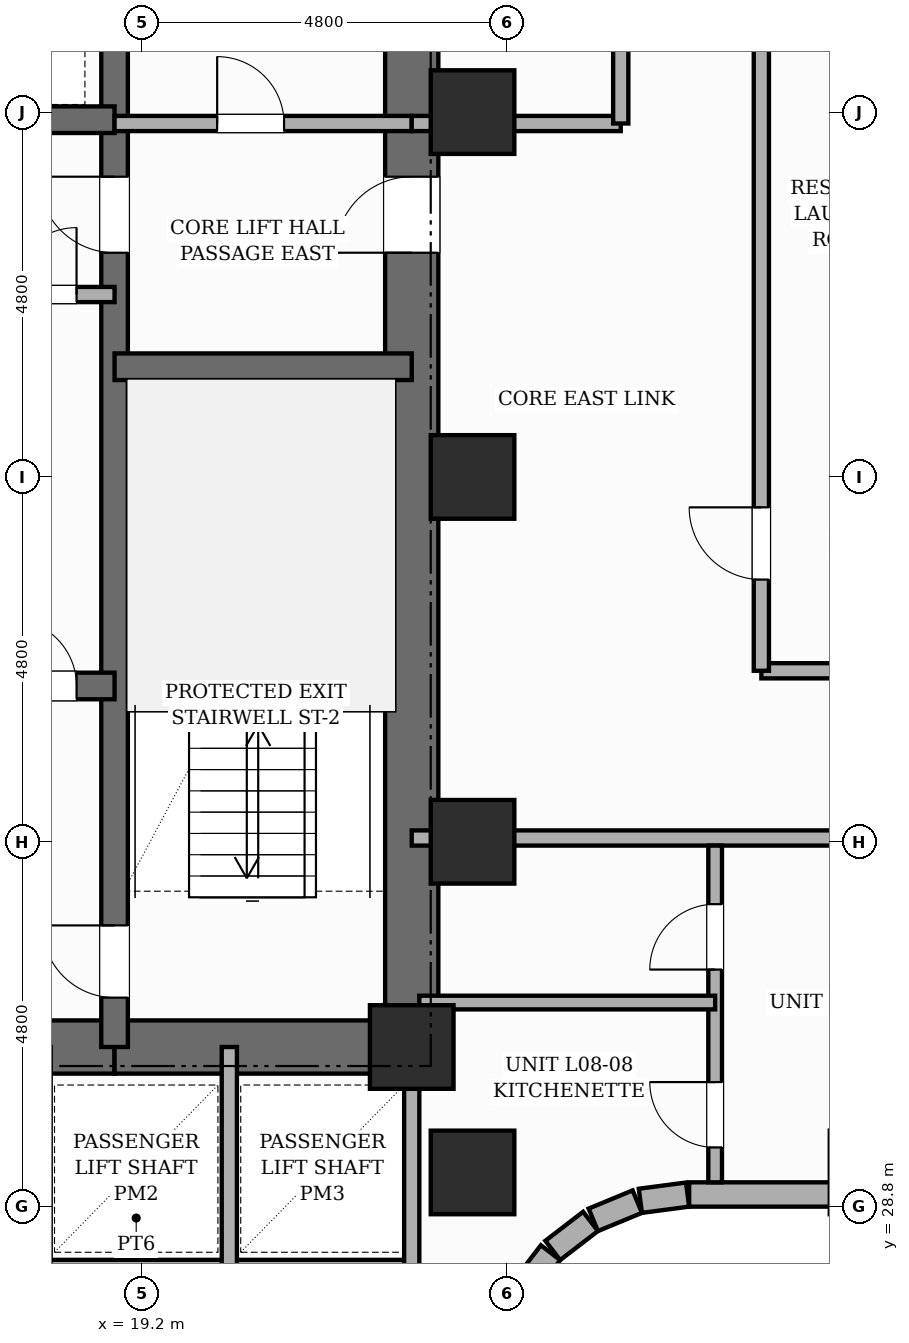
"""IFC4 building model, lengths in metres.
Left out: names, types, materials, properties, quantities, classifications, styles, units other than length and angle.
Written with IfcOpenShell. Run it as: python <this file> out.ifc"""

import sys

from ifc_helpers import new_model, si_unit, direction, frame, frame_2d, origin, origin_2d, place, context, subcontext, project, spatial, rectangle, extrude, element, fill, save


model = new_model("IFC4")
c1 = context("Model", 3, precision=1e-05, world=origin(), true_north=direction((0.0, 1.0)))
c2 = subcontext(c1, "Body", "Model", "MODEL_VIEW")
j1 = project(units=[si_unit("LENGTHUNIT", "METRE"), si_unit("PLANEANGLEUNIT", "RADIAN")], contexts=[c1])
p1 = place(None, origin())
s1 = spatial("IfcSite", under=j1, at=p1, CompositionType="ELEMENT")
p2 = place(p1, origin())
s2 = spatial("IfcBuilding", under=s1, at=p2, CompositionType="ELEMENT")
p3 = place(p2, frame((0.0, 0.0, 35.8)))
s3 = spatial("IfcBuildingStorey", under=s2, at=p3, CompositionType="ELEMENT", Elevation=35.8)
p4 = place(p3, frame((22.75, 30.55, 0.0), z_axis=(0.0, 0.0, 1.0), x_axis=(0.0, 1.0, 0.0)))
e1 = element("IfcWall", 1, at=p4, inside=s3, PredefinedType="SHEAR", context=c2, shape_type="SweptSolid", body=[
    extrude(rectangle(XDim=15.6, YDim=0.7, at=frame_2d((7.8, 0.0))), origin(), (0.0, 0.0, 1.0), 3.6),
])
p5 = place(p4, frame((10.8, 0.0, 0.0)))
e2 = element("IfcOpeningElement", 2, at=p5, cuts=e1, PredefinedType="OPENING", context=c2, shape_type="SweptSolid", body=[
    extrude(rectangle(XDim=1.0, YDim=2.15, at=frame_2d((0.5, 1.075))), frame((0.0, 0.36, 0.0), z_axis=(0.0, -1.0, 0.0), x_axis=(1.0, 0.0, 0.0)), (0.0, 0.0, 1.0), 0.72),
])
p6 = place(p3, frame((9.96, 30.9, 0.0), z_axis=(0.0, 0.0, 1.0), x_axis=(1.0, 0.0, 0.0)))
e3 = element("IfcWall", 3, at=p6, inside=s3, PredefinedType="SHEAR", context=c2, shape_type="SweptSolid", body=[
    extrude(rectangle(XDim=8.88, YDim=0.7, at=frame_2d((4.44, 0.0))), origin(), (0.0, 0.0, 1.0), 3.6),
])
p7 = place(p6, frame((4.09, 0.0, 0.0)))
e4 = element("IfcOpeningElement", 4, at=p7, cuts=e3, PredefinedType="OPENING", context=c2, shape_type="SweptSolid", body=[
    extrude(rectangle(XDim=1.0, YDim=2.15, at=frame_2d((0.5, 1.075))), frame((0.0, 0.36, 0.0), z_axis=(0.0, -1.0, 0.0), x_axis=(1.0, 0.0, 0.0)), (0.0, 0.0, 1.0), 0.72),
])
p8 = place(p3, frame((18.84, 30.9, 0.0), z_axis=(0.0, 0.0, 1.0), x_axis=(1.0, 0.0, 0.0)))
e5 = element("IfcWall", 5, at=p8, inside=s3, PredefinedType="SHEAR", context=c2, shape_type="SweptSolid", body=[
    extrude(rectangle(XDim=3.91, YDim=0.7, at=frame_2d((1.955, 0.0))), origin(), (0.0, 0.0, 1.0), 3.6),
])
p9 = place(p3, frame((18.84, 30.9, 0.0), z_axis=(0.0, 0.0, 1.0), x_axis=(0.0, 1.0, 0.0)))
e6 = element("IfcWall", 6, at=p9, inside=s3, PredefinedType="SHEAR", context=c2, shape_type="SweptSolid", body=[
    extrude(rectangle(XDim=14.9, YDim=0.35, at=frame_2d((7.45, 0.0))), origin(), (0.0, 0.0, 1.0), 3.6),
])
p10 = place(p9, frame((0.65, 0.0, 0.0)))
e7 = element("IfcOpeningElement", 7, at=p10, cuts=e6, PredefinedType="OPENING", context=c2, shape_type="SweptSolid", body=[
    extrude(rectangle(XDim=0.95, YDim=2.1, at=frame_2d((0.475, 1.05))), frame((0.0, 0.185, 0.0), z_axis=(0.0, -1.0, 0.0), x_axis=(1.0, 0.0, 0.0)), (0.0, 0.0, 1.0), 0.37),
])
p11 = place(p9, frame((10.45, 0.0, 0.0)))
e8 = element("IfcOpeningElement", 8, at=p11, cuts=e6, PredefinedType="OPENING", context=c2, shape_type="SweptSolid", body=[
    extrude(rectangle(XDim=1.0, YDim=2.15, at=frame_2d((0.5, 1.075))), frame((0.0, 0.185, 0.0), z_axis=(0.0, -1.0, 0.0), x_axis=(1.0, 0.0, 0.0)), (0.0, 0.0, 1.0), 0.37),
])
p12 = place(p3, frame((18.84, 39.85, 0.0), z_axis=(0.0, 0.0, 1.0), x_axis=(1.0, 0.0, 0.0)))
e9 = element("IfcWall", 9, at=p12, inside=s3, PredefinedType="SHEAR", context=c2, shape_type="SweptSolid", body=[
    extrude(rectangle(XDim=3.91, YDim=0.35, at=frame_2d((1.955, 0.0))), origin(), (0.0, 0.0, 1.0), 3.6),
])
p13 = place(p3, frame((9.96, 35.65, 0.0), z_axis=(0.0, 0.0, 1.0), x_axis=(1.0, 0.0, 0.0)))
e10 = element("IfcWall", 10, at=p13, inside=s3, PredefinedType="SHEAR", context=c2, shape_type="SweptSolid", body=[
    extrude(rectangle(XDim=8.88, YDim=0.35, at=frame_2d((4.44, 0.0))), origin(), (0.0, 0.0, 1.0), 3.6),
])
p14 = place(p13, frame((0.84, 0.0, 0.0)))
e11 = element("IfcOpeningElement", 11, at=p14, cuts=e10, PredefinedType="OPENING", context=c2, shape_type="SweptSolid", body=[
    extrude(rectangle(XDim=1.1, YDim=2.15, at=frame_2d((0.55, 1.075))), frame((0.0, 0.185, 0.0), z_axis=(0.0, -1.0, 0.0), x_axis=(1.0, 0.0, 0.0)), (0.0, 0.0, 1.0), 0.37),
])
p15 = place(p13, frame((5.24, 0.0, 0.0)))
e12 = element("IfcOpeningElement", 12, at=p15, cuts=e10, PredefinedType="OPENING", context=c2, shape_type="SweptSolid", body=[
    extrude(rectangle(XDim=1.1, YDim=2.15, at=frame_2d((0.55, 1.075))), frame((0.0, 0.185, 0.0), z_axis=(0.0, -1.0, 0.0), x_axis=(1.0, 0.0, 0.0)), (0.0, 0.0, 1.0), 0.37),
])
p16 = place(p13, frame((7.5, 0.0, 0.0)))
e13 = element("IfcOpeningElement", 13, at=p16, cuts=e10, PredefinedType="OPENING", context=c2, shape_type="SweptSolid", body=[
    extrude(rectangle(XDim=0.88, YDim=2.1, at=frame_2d((0.44, 1.05))), frame((0.0, 0.185, 0.0), z_axis=(0.0, -1.0, 0.0), x_axis=(1.0, 0.0, 0.0)), (0.0, 0.0, 1.0), 0.37),
])
p17 = place(p3, frame((9.96, 43.1, 0.0), z_axis=(0.0, 0.0, 1.0), x_axis=(1.0, 0.0, 0.0)))
e14 = element("IfcWall", 14, at=p17, inside=s3, PredefinedType="SHEAR", context=c2, shape_type="SweptSolid", body=[
    extrude(rectangle(XDim=8.88, YDim=0.35, at=frame_2d((4.44, 0.0))), origin(), (0.0, 0.0, 1.0), 3.6),
])
for number, where, z_axis, x_axis in (
    (15, (22.75, 30.9, 0.0), (0.0, 0.0, 1.0), (1.0, 0.0, 0.0)),
    (16, (23.55, 29.25, 0.0), (0.0, 0.0, 1.0), (1.0, 0.0, 0.0)),
    (17, (23.55, 33.6, 0.0), (0.0, 0.0, 1.0), (1.0, 0.0, 0.0)),
    (18, (23.55, 38.4, 0.0), (0.0, 0.0, 1.0), (1.0, 0.0, 0.0)),
    (19, (23.55, 43.2, 0.0), (0.0, 0.0, 1.0), (1.0, 0.0, 0.0)),
):
    element("IfcColumn", number, at=place(p3, frame(where, z_axis=z_axis, x_axis=x_axis)), inside=s3, PredefinedType="COLUMN", context=c2, shape_type="SweptSolid", body=[
        extrude(rectangle(XDim=1.1, YDim=1.1, at=origin_2d()), origin(), (0.0, 0.0, 1.0), 3.6),
    ])
p18 = place(p3, frame((55.2, 28.96, 0.0), z_axis=(0.0, 0.0, 1.0), x_axis=(-1.0, 0.0, 0.0)))
e20 = element("IfcWall", 20, at=p18, inside=s3, PredefinedType="STANDARD", context=c2, shape_type="SweptSolid", body=[
    extrude(rectangle(XDim=28.8, YDim=0.32, at=frame_2d((14.4, 0.0))), origin(), (0.0, 0.0, 1.0), 2.53),
])
p19 = place(p18, frame((23.415, 0.0, 0.65)))
e21 = element("IfcOpeningElement", 21, at=p19, cuts=e20, PredefinedType="OPENING", context=c2, shape_type="SweptSolid", body=[
    extrude(rectangle(XDim=1.4, YDim=1.1, at=frame_2d((0.7, 0.55))), frame((0.0, 0.17, 0.0), z_axis=(0.0, -1.0, 0.0), x_axis=(1.0, 0.0, 0.0)), (0.0, 0.0, 1.0), 0.34),
])
p20 = place(p18, frame((15.034, 0.0, 0.45)))
e22 = element("IfcOpeningElement", 22, at=p20, cuts=e20, PredefinedType="OPENING", context=c2, shape_type="SweptSolid", body=[
    extrude(rectangle(XDim=0.95, YDim=1.8, at=frame_2d((0.475, 0.9))), frame((0.0, 0.17, 0.0), z_axis=(0.0, -1.0, 0.0), x_axis=(1.0, 0.0, 0.0)), (0.0, 0.0, 1.0), 0.34),
])
p21 = place(p18, frame((5.25, 0.0, 0.45)))
e23 = element("IfcOpeningElement", 23, at=p21, cuts=e20, PredefinedType="OPENING", context=c2, shape_type="SweptSolid", body=[
    extrude(rectangle(XDim=0.95, YDim=1.8, at=frame_2d((0.475, 0.9))), frame((0.0, 0.17, 0.0), z_axis=(0.0, -1.0, 0.0), x_axis=(1.0, 0.0, 0.0)), (0.0, 0.0, 1.0), 0.34),
])
p22 = place(p18, frame((12.979, 0.0, 0.65)))
e24 = element("IfcOpeningElement", 24, at=p22, cuts=e20, PredefinedType="OPENING", context=c2, shape_type="SweptSolid", body=[
    extrude(rectangle(XDim=1.4, YDim=1.1, at=frame_2d((0.7, 0.55))), frame((0.0, 0.17, 0.0), z_axis=(0.0, -1.0, 0.0), x_axis=(1.0, 0.0, 0.0)), (0.0, 0.0, 1.0), 0.34),
])
p23 = place(p18, frame((0.47, 0.0, 0.65)))
e25 = element("IfcOpeningElement", 25, at=p23, cuts=e20, PredefinedType="OPENING", context=c2, shape_type="SweptSolid", body=[
    extrude(rectangle(XDim=1.4, YDim=1.1, at=frame_2d((0.7, 0.55))), frame((0.0, 0.17, 0.0), z_axis=(0.0, -1.0, 0.0), x_axis=(1.0, 0.0, 0.0)), (0.0, 0.0, 1.0), 0.34),
])
p24 = place(p3, frame((26.379, 28.958, 0.0), z_axis=(0.0, 0.0, 1.0), x_axis=(-0.991447664465, -0.130504898859, 0.0)))
e26 = element("IfcWall", 26, at=p24, inside=s3, PredefinedType="STANDARD", context=c2, shape_type="SweptSolid", body=[
    extrude(rectangle(XDim=0.627, YDim=0.32, at=frame_2d((0.313, 0.0))), origin(), (0.0, 0.0, 1.0), 2.53),
])
p25 = place(p3, frame((25.718, 28.866, 0.0), z_axis=(0.0, 0.0, 1.0), x_axis=(-0.923836271867, -0.382787856107, 0.0)))
e27 = element("IfcWall", 27, at=p25, inside=s3, PredefinedType="STANDARD", context=c2, shape_type="SweptSolid", body=[
    extrude(rectangle(XDim=0.626, YDim=0.32, at=frame_2d((0.313, 0.0))), origin(), (0.0, 0.0, 1.0), 3.35),
])
for number, where, z_axis, x_axis in (
    (28, (25.103, 28.605, 0.0), (0.0, 0.0, 1.0), (-0.793, -0.609, 0.0)),
    (29, (24.576, 28.195, 0.0), (0.0, 0.0, 1.0), (-0.609, -0.793, 0.0)),
):
    element("IfcWall", number, at=place(p3, frame(where, z_axis=z_axis, x_axis=x_axis)), inside=s3, PredefinedType="STANDARD", context=c2, shape_type="SweptSolid", body=[
        extrude(rectangle(XDim=0.626, YDim=0.32, at=frame_2d((0.313, 0.0))), origin(), (0.0, 0.0, 1.0), 3.35),
    ])
p26 = place(p3, frame((9.96, 40.8, 0.0), z_axis=(0.0, 0.0, 1.0), x_axis=(1.0, 0.0, 0.0)))
e30 = element("IfcWall", 30, at=p26, inside=s3, PredefinedType="POLYGONAL", context=c2, shape_type="SweptSolid", body=[
    extrude(rectangle(XDim=8.88, YDim=0.2, at=frame_2d((4.44, 0.0))), origin(), (0.0, 0.0, 1.0), 3.35),
])
p27 = place(p26, frame((7.5, 0.0, 0.0)))
e31 = element("IfcOpeningElement", 31, at=p27, cuts=e30, PredefinedType="OPENING", context=c2, shape_type="SweptSolid", body=[
    extrude(rectangle(XDim=0.88, YDim=2.1, at=frame_2d((0.44, 1.05))), frame((0.0, 0.11, 0.0), z_axis=(0.0, -1.0, 0.0), x_axis=(1.0, 0.0, 0.0)), (0.0, 0.0, 1.0), 0.22),
])
p28 = place(p26, frame((1.7, 0.0, 0.0)))
e32 = element("IfcOpeningElement", 32, at=p28, cuts=e30, PredefinedType="OPENING", context=c2, shape_type="SweptSolid", body=[
    extrude(rectangle(XDim=0.88, YDim=2.1, at=frame_2d((0.44, 1.05))), frame((0.0, 0.11, 0.0), z_axis=(0.0, -1.0, 0.0), x_axis=(1.0, 0.0, 0.0)), (0.0, 0.0, 1.0), 0.22),
])
p29 = place(p26, frame((4.9, 0.0, 0.0)))
e33 = element("IfcOpeningElement", 33, at=p29, cuts=e30, PredefinedType="OPENING", context=c2, shape_type="SweptSolid", body=[
    extrude(rectangle(XDim=0.88, YDim=2.1, at=frame_2d((0.44, 1.05))), frame((0.0, 0.11, 0.0), z_axis=(0.0, -1.0, 0.0), x_axis=(1.0, 0.0, 0.0)), (0.0, 0.0, 1.0), 0.22),
])
p30 = place(p3, frame((18.84, 43.05, 0.0), z_axis=(0.0, 0.0, 1.0), x_axis=(1.0, 0.0, 0.0)))
e34 = element("IfcWall", 34, at=p30, inside=s3, PredefinedType="POLYGONAL", context=c2, shape_type="SweptSolid", body=[
    extrude(rectangle(XDim=3.91, YDim=0.2, at=frame_2d((1.955, 0.0))), origin(), (0.0, 0.0, 1.0), 2.53),
])
p31 = place(p30, frame((1.35, 0.0, 0.0)))
e35 = element("IfcOpeningElement", 35, at=p31, cuts=e34, PredefinedType="OPENING", context=c2, shape_type="SweptSolid", body=[
    extrude(rectangle(XDim=0.88, YDim=2.1, at=frame_2d((0.44, 1.05))), frame((0.0, 0.11, 0.0), z_axis=(0.0, -1.0, 0.0), x_axis=(1.0, 0.0, 0.0)), (0.0, 0.0, 1.0), 0.22),
])
p32 = place(p3, frame((15.5, 28.0, 0.0), z_axis=(0.0, 0.0, 1.0), x_axis=(1.0, 0.0, 0.0)))
e36 = element("IfcWall", 36, at=p32, inside=s3, PredefinedType="POLYGONAL", context=c2, shape_type="SweptSolid", body=[
    extrude(rectangle(XDim=7.25, YDim=0.2, at=frame_2d((3.625, 0.0))), origin(), (0.0, 0.0, 1.0), 3.35),
])
p33 = place(p3, frame((22.75, 27.9, 0.0), z_axis=(0.0, 0.0, 1.0), x_axis=(0.0, 1.0, 0.0)))
e37 = element("IfcWall", 37, at=p33, inside=s3, PredefinedType="POLYGONAL", context=c2, shape_type="SweptSolid", body=[
    extrude(rectangle(XDim=3.0, YDim=0.2, at=frame_2d((1.5, 0.0))), origin(), (0.0, 0.0, 1.0), 3.35),
])
p34 = place(p3, frame((20.35, 28.0, 0.0), z_axis=(0.0, 0.0, 1.0), x_axis=(0.0, 1.0, 0.0)))
e38 = element("IfcWall", 38, at=p34, inside=s3, PredefinedType="POLYGONAL", context=c2, shape_type="SweptSolid", body=[
    extrude(rectangle(XDim=2.9, YDim=0.2, at=frame_2d((1.45, 0.0))), origin(), (0.0, 0.0, 1.0), 3.35),
])
p35 = place(p3, frame((22.75, 33.65, 0.0), z_axis=(0.0, 0.0, 1.0), x_axis=(1.0, 0.0, 0.0)))
e39 = element("IfcWall", 39, at=p35, inside=s3, PredefinedType="PARTITIONING", context=c2, shape_type="SweptSolid", body=[
    extrude(rectangle(XDim=34.53, YDim=0.2, at=frame_2d((17.265, 0.0))), origin(), (0.0, 0.0, 1.0), 2.53),
])
p36 = place(p35, frame((6.491, 0.0, 0.0)))
e40 = element("IfcOpeningElement", 40, at=p36, cuts=e39, PredefinedType="OPENING", context=c2, shape_type="SweptSolid", body=[
    extrude(rectangle(XDim=0.98, YDim=2.18, at=frame_2d((0.49, 1.09))), frame((0.0, 0.11, 0.0), z_axis=(0.0, -1.0, 0.0), x_axis=(1.0, 0.0, 0.0)), (0.0, 0.0, 1.0), 0.22),
])
p37 = place(p35, frame((13.406, 0.0, 0.0)))
e41 = element("IfcOpeningElement", 41, at=p37, cuts=e39, PredefinedType="OPENING", context=c2, shape_type="SweptSolid", body=[
    extrude(rectangle(XDim=0.98, YDim=2.18, at=frame_2d((0.49, 1.09))), frame((0.0, 0.11, 0.0), z_axis=(0.0, -1.0, 0.0), x_axis=(1.0, 0.0, 0.0)), (0.0, 0.0, 1.0), 0.22),
])
p38 = place(p35, frame((24.09, 0.0, 0.0)))
e42 = element("IfcOpeningElement", 42, at=p38, cuts=e39, PredefinedType="OPENING", context=c2, shape_type="SweptSolid", body=[
    extrude(rectangle(XDim=0.98, YDim=2.18, at=frame_2d((0.49, 1.09))), frame((0.0, 0.11, 0.0), z_axis=(0.0, -1.0, 0.0), x_axis=(1.0, 0.0, 0.0)), (0.0, 0.0, 1.0), 0.22),
])
p39 = place(p3, frame((27.35, 35.85, 0.0), z_axis=(0.0, 0.0, 1.0), x_axis=(1.0, 0.0, 0.0)))
e43 = element("IfcWall", 43, at=p39, inside=s3, PredefinedType="PARTITIONING", context=c2, shape_type="SweptSolid", body=[
    extrude(rectangle(XDim=14.43, YDim=0.2, at=frame_2d((7.215, 0.0))), origin(), (0.0, 0.0, 1.0), 3.35),
])
p40 = place(p39, frame((4.803, 0.0, 0.0)))
e44 = element("IfcOpeningElement", 44, at=p40, cuts=e43, PredefinedType="OPENING", context=c2, shape_type="SweptSolid", body=[
    extrude(rectangle(XDim=0.98, YDim=2.18, at=frame_2d((0.49, 1.09))), frame((0.0, 0.11, 0.0), z_axis=(0.0, -1.0, 0.0), x_axis=(1.0, 0.0, 0.0)), (0.0, 0.0, 1.0), 0.22),
])
p41 = place(p3, frame((27.35, 35.85, 0.0), z_axis=(0.0, 0.0, 1.0), x_axis=(0.0, 1.0, 0.0)))
e45 = element("IfcWall", 45, at=p41, inside=s3, PredefinedType="PARTITIONING", context=c2, shape_type="SweptSolid", body=[
    extrude(rectangle(XDim=11.83, YDim=0.2, at=frame_2d((5.915, 0.0))), origin(), (0.0, 0.0, 1.0), 3.35),
])
p42 = place(p41, frame((1.2, 0.0, 0.0)))
e46 = element("IfcOpeningElement", 46, at=p42, cuts=e45, PredefinedType="OPENING", context=c2, shape_type="SweptSolid", body=[
    extrude(rectangle(XDim=0.95, YDim=2.15, at=frame_2d((0.475, 1.075))), frame((0.0, 0.11, 0.0), z_axis=(0.0, -1.0, 0.0), x_axis=(1.0, 0.0, 0.0)), (0.0, 0.0, 1.0), 0.22),
])
p43 = place(p3, frame((22.75, 43.05, 0.0), z_axis=(0.0, 0.0, 1.0), x_axis=(1.0, 0.0, 0.0)))
e47 = element("IfcWall", 47, at=p43, inside=s3, PredefinedType="PARTITIONING", context=c2, shape_type="SweptSolid", body=[
    extrude(rectangle(XDim=2.75, YDim=0.2, at=frame_2d((1.375, 0.0))), origin(), (0.0, 0.0, 1.0), 2.53),
])
p44 = place(p3, frame((25.5, 43.05, 0.0), z_axis=(0.0, 0.0, 1.0), x_axis=(0.0, 1.0, 0.0)))
e48 = element("IfcWall", 48, at=p44, inside=s3, PredefinedType="PARTITIONING", context=c2, shape_type="SweptSolid", body=[
    extrude(rectangle(XDim=2.75, YDim=0.2, at=frame_2d((1.375, 0.0))), origin(), (0.0, 0.0, 1.0), 3.35),
])
p45 = place(p3, frame((26.742, 29.12, 0.0), z_axis=(0.0, 0.0, 1.0), x_axis=(0.0, 1.0, 0.0)))
e49 = element("IfcWall", 49, at=p45, inside=s3, PredefinedType="PLUMBINGWALL", context=c2, shape_type="SweptSolid", body=[
    extrude(rectangle(XDim=4.43, YDim=0.18, at=frame_2d((2.215, 0.0))), origin(), (0.0, 0.0, 1.0), 3.35),
])
p46 = place(p45, frame((0.459, 0.0, 0.0)))
e50 = element("IfcOpeningElement", 50, at=p46, cuts=e49, PredefinedType="OPENING", context=c2, shape_type="SweptSolid", body=[
    extrude(rectangle(XDim=0.86, YDim=2.1, at=frame_2d((0.43, 1.05))), frame((0.0, 0.1, 0.0), z_axis=(0.0, -1.0, 0.0), x_axis=(1.0, 0.0, 0.0)), (0.0, 0.0, 1.0), 0.2),
])
p47 = place(p45, frame((2.799, 0.0, 0.0)))
e51 = element("IfcOpeningElement", 51, at=p47, cuts=e49, PredefinedType="OPENING", context=c2, shape_type="SweptSolid", body=[
    extrude(rectangle(XDim=0.86, YDim=2.1, at=frame_2d((0.43, 1.05))), frame((0.0, 0.1, 0.0), z_axis=(0.0, -1.0, 0.0), x_axis=(1.0, 0.0, 0.0)), (0.0, 0.0, 1.0), 0.2),
])
p48 = place(p3, frame((22.85, 31.485, 0.0), z_axis=(0.0, 0.0, 1.0), x_axis=(1.0, 0.0, 0.0)))
e52 = element("IfcWall", 52, at=p48, inside=s3, PredefinedType="PLUMBINGWALL", context=c2, shape_type="SweptSolid", body=[
    extrude(rectangle(XDim=3.892, YDim=0.18, at=frame_2d((1.946, 0.0))), origin(), (0.0, 0.0, 1.0), 3.35),
])
p49 = place(p10, origin())
e53 = element("IfcDoor", 53, at=p49, inside=s3, OperationType="SINGLE_SWING_RIGHT", PredefinedType="DOOR", context=c2, shape_type="SweptSolid", body=[
    extrude(rectangle(XDim=0.95, YDim=2.1, at=frame_2d((0.475, 1.05))), frame((0.0, 0.025, 0.0), z_axis=(0.0, -1.0, 0.0), x_axis=(1.0, 0.0, 0.0)), (0.0, 0.0, 1.0), 0.05),
])
fill(e7, e53)
p50 = place(p16, origin())
e54 = element("IfcDoor", 54, at=p50, inside=s3, OperationType="SINGLE_SWING_LEFT", PredefinedType="DOOR", context=c2, shape_type="SweptSolid", body=[
    extrude(rectangle(XDim=0.88, YDim=2.1, at=frame_2d((0.44, 1.05))), frame((0.0, 0.025, 0.0), z_axis=(0.0, -1.0, 0.0), x_axis=(1.0, 0.0, 0.0)), (0.0, 0.0, 1.0), 0.05),
])
fill(e13, e54)
p51 = place(p27, origin())
e55 = element("IfcDoor", 55, at=p51, inside=s3, OperationType="SINGLE_SWING_RIGHT", PredefinedType="DOOR", context=c2, shape_type="SweptSolid", body=[
    extrude(rectangle(XDim=0.88, YDim=2.1, at=frame_2d((0.44, 1.05))), frame((0.0, 0.025, 0.0), z_axis=(0.0, -1.0, 0.0), x_axis=(1.0, 0.0, 0.0)), (0.0, 0.0, 1.0), 0.05),
])
fill(e31, e55)
p52 = place(p11, origin())
e56 = element("IfcDoor", 56, at=p52, inside=s3, OperationType="SINGLE_SWING_RIGHT", PredefinedType="DOOR", context=c2, shape_type="SweptSolid", body=[
    extrude(rectangle(XDim=1.0, YDim=2.15, at=frame_2d((0.5, 1.075))), frame((0.0, 0.025, 0.0), z_axis=(0.0, -1.0, 0.0), x_axis=(1.0, 0.0, 0.0)), (0.0, 0.0, 1.0), 0.05),
])
fill(e8, e56)
p53 = place(p5, origin())
e57 = element("IfcDoor", 57, at=p53, inside=s3, OperationType="SINGLE_SWING_LEFT", PredefinedType="DOOR", context=c2, shape_type="SweptSolid", body=[
    extrude(rectangle(XDim=1.0, YDim=2.15, at=frame_2d((0.5, 1.075))), frame((0.0, 0.025, 0.0), z_axis=(0.0, -1.0, 0.0), x_axis=(1.0, 0.0, 0.0)), (0.0, 0.0, 1.0), 0.05),
])
fill(e2, e57)
p54 = place(p31, origin())
e58 = element("IfcDoor", 58, at=p54, inside=s3, OperationType="SINGLE_SWING_LEFT", PredefinedType="DOOR", context=c2, shape_type="SweptSolid", body=[
    extrude(rectangle(XDim=0.88, YDim=2.1, at=frame_2d((0.44, 1.05))), frame((0.0, 0.025, 0.0), z_axis=(0.0, -1.0, 0.0), x_axis=(1.0, 0.0, 0.0)), (0.0, 0.0, 1.0), 0.05),
])
fill(e35, e58)
p55 = place(p46, origin())
e59 = element("IfcDoor", 59, at=p55, inside=s3, OperationType="SINGLE_SWING_RIGHT", PredefinedType="DOOR", context=c2, shape_type="SweptSolid", body=[
    extrude(rectangle(XDim=0.86, YDim=2.1, at=frame_2d((0.43, 1.05))), frame((0.0, 0.025, 0.0), z_axis=(0.0, -1.0, 0.0), x_axis=(1.0, 0.0, 0.0)), (0.0, 0.0, 1.0), 0.05),
])
fill(e50, e59)
p56 = place(p47, origin())
e60 = element("IfcDoor", 60, at=p56, inside=s3, OperationType="SINGLE_SWING_LEFT", PredefinedType="DOOR", context=c2, shape_type="SweptSolid", body=[
    extrude(rectangle(XDim=0.86, YDim=2.1, at=frame_2d((0.43, 1.05))), frame((0.0, 0.025, 0.0), z_axis=(0.0, -1.0, 0.0), x_axis=(1.0, 0.0, 0.0)), (0.0, 0.0, 1.0), 0.05),
])
fill(e51, e60)
p57 = place(p42, origin())
e61 = element("IfcDoor", 61, at=p57, inside=s3, OperationType="SINGLE_SWING_RIGHT", PredefinedType="DOOR", context=c2, shape_type="SweptSolid", body=[
    extrude(rectangle(XDim=0.95, YDim=2.15, at=frame_2d((0.475, 1.075))), frame((0.0, 0.025, 0.0), z_axis=(0.0, -1.0, 0.0), x_axis=(1.0, 0.0, 0.0)), (0.0, 0.0, 1.0), 0.05),
])
fill(e46, e61)
save(model, sys.argv[1])
